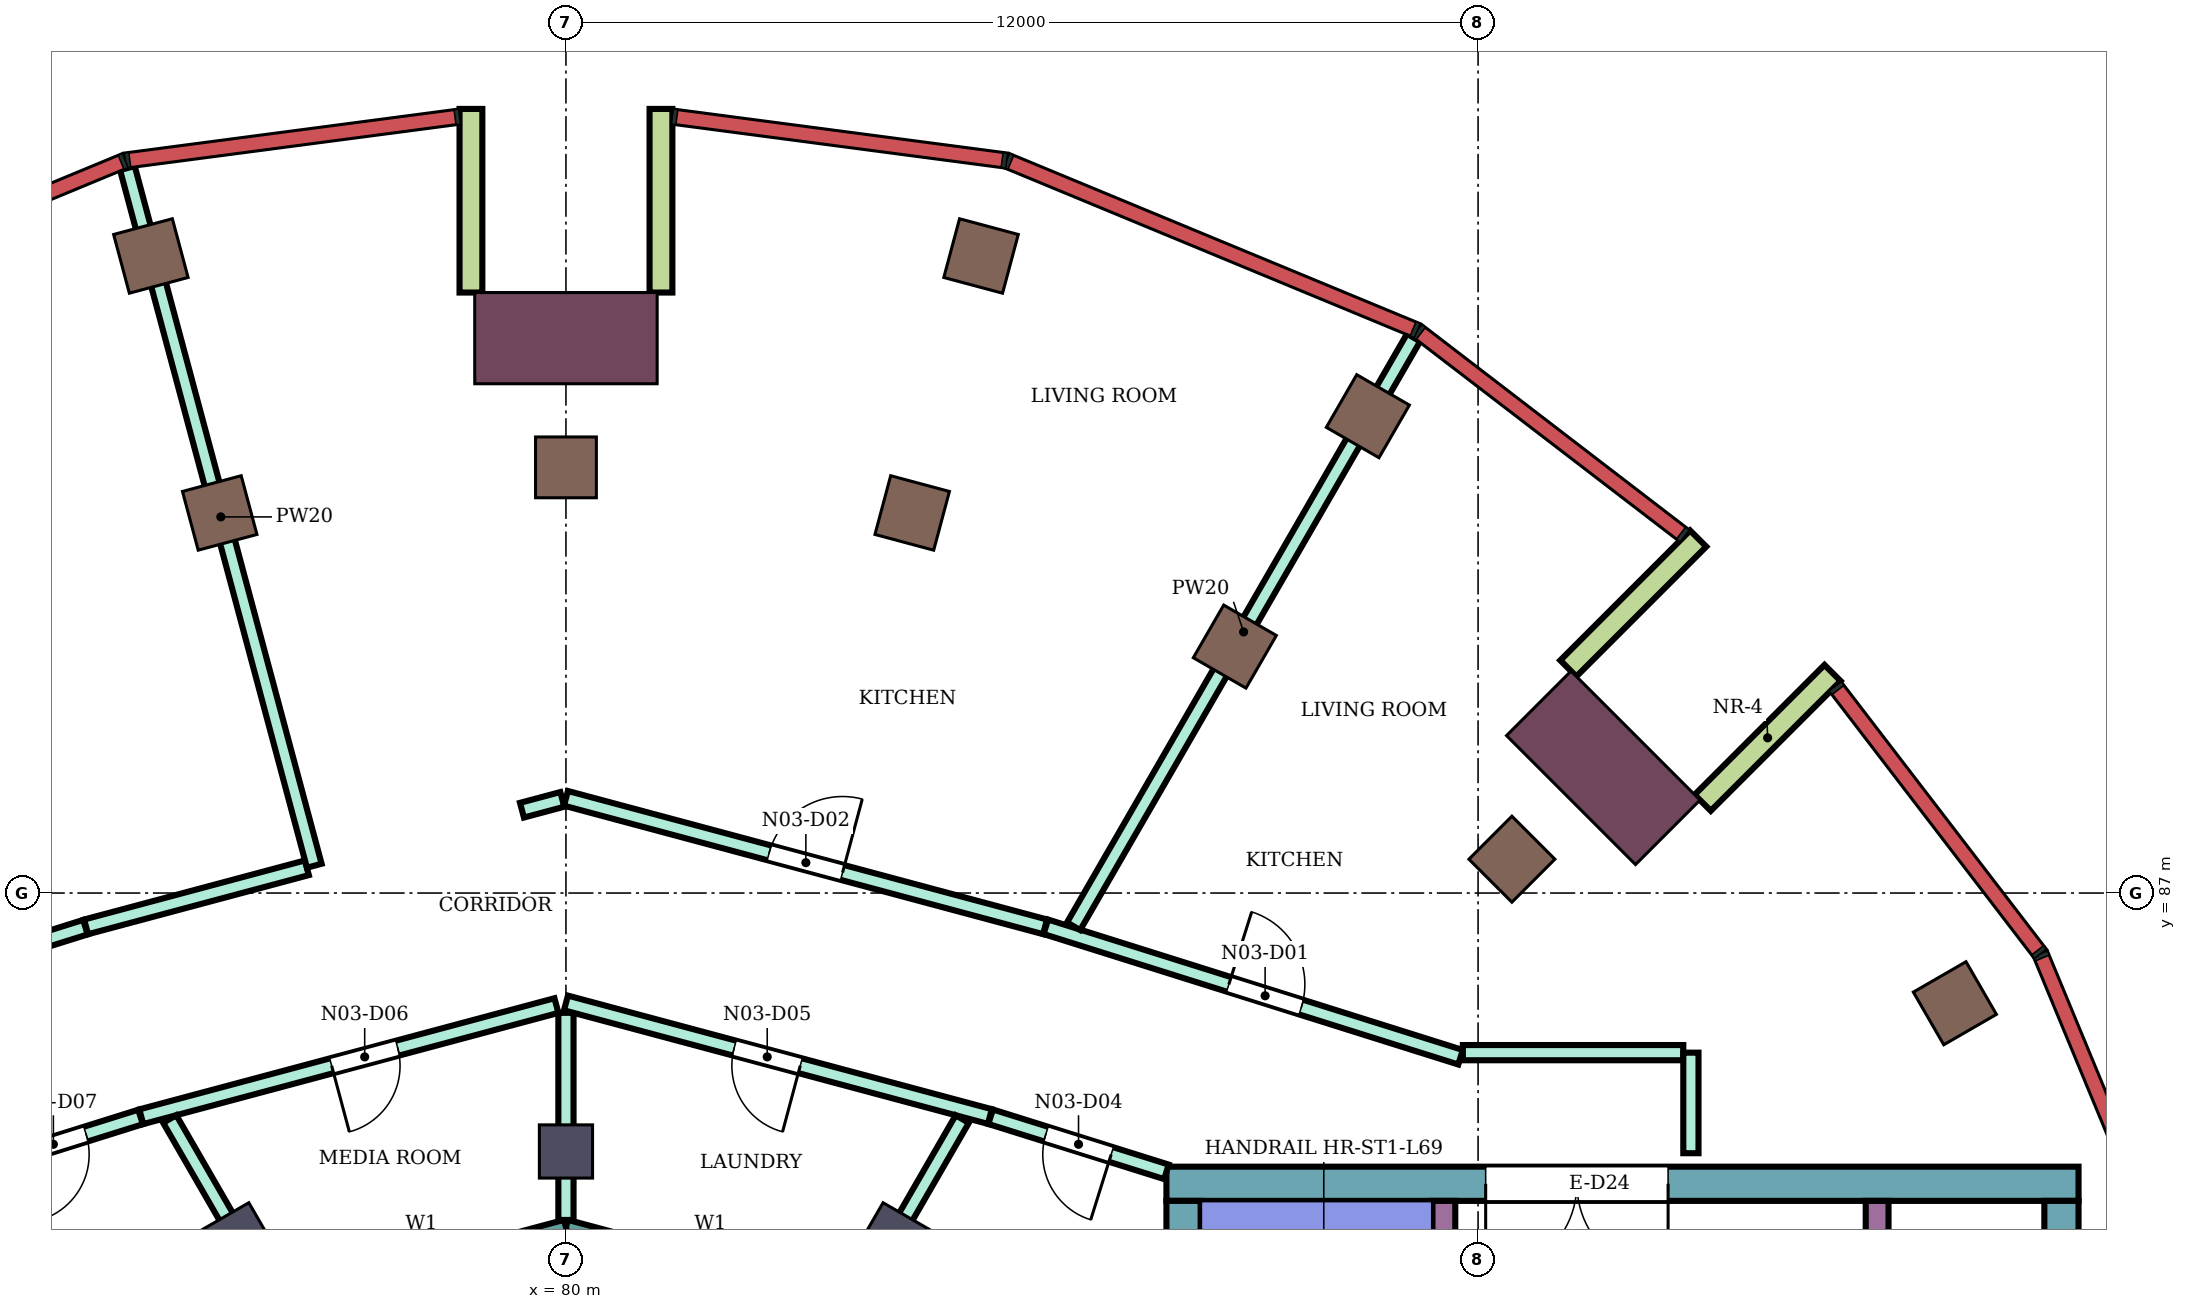
"""IFC4 building model, lengths in metres.
Left out: names, types, materials, properties, quantities, classifications, styles, units other than length and angle.
Written with IfcOpenShell. Run it as: python <this file> out.ifc"""

import sys

from ifc_helpers import new_model, si_unit, direction, frame, frame_2d, origin, origin_2d, place, context, subcontext, project, spatial, rectangle, extrude, element, fill, save


model = new_model("IFC4")
c1 = context("Model", 3, precision=1e-05, world=origin(), true_north=direction((0.0, 1.0)))
c2 = subcontext(c1, "Body", "Model", "MODEL_VIEW")
j1 = project(units=[si_unit("LENGTHUNIT", "METRE"), si_unit("PLANEANGLEUNIT", "RADIAN")], contexts=[c1])
p1 = place(None, origin())
s1 = spatial("IfcSite", under=j1, at=p1, CompositionType="ELEMENT")
p2 = place(p1, origin())
s2 = spatial("IfcBuilding", under=s1, at=p2, CompositionType="ELEMENT")
p3 = place(p2, frame((0.0, 0.0, 300.9)))
s3 = spatial("IfcBuildingStorey", under=s2, at=p3, CompositionType="ELEMENT", Elevation=300.9)
for number, where, z_axis, x_axis in (
    (1, (98.273, 85.55, 0.0), (0.0, 0.0, 1.0), (0.866, 0.5, 0.0)),
    (2, (90.55, 93.273, 0.0), (0.0, 0.0, 1.0), (0.5, 0.866, 0.0)),
    (3, (85.461, 95.381, 0.0), (0.0, 0.0, 1.0), (0.259, 0.966, 0.0)),
    (4, (74.539, 95.381, 0.0), (0.0, 0.0, 1.0), (-0.259, 0.966, 0.0)),
    (5, (92.445, 87.445, 0.0), (0.0, 0.0, 1.0), (0.707, 0.707, 0.0)),
    (6, (88.8, 90.242, 0.0), (0.0, 0.0, 1.0), (0.5, 0.866, 0.0)),
    (7, (84.555, 92.0, 0.0), (0.0, 0.0, 1.0), (0.259, 0.966, 0.0)),
    (8, (80.0, 92.6, 0.0), (0.0, 0.0, 1.0), (0.0, 1.0, 0.0)),
    (9, (75.445, 92.0, 0.0), (0.0, 0.0, 1.0), (-0.259, 0.966, 0.0)),
):
    element("IfcColumn", number, at=place(p3, frame(where, z_axis=z_axis, x_axis=x_axis)), inside=s3, PredefinedType="COLUMN", context=c2, shape_type="SweptSolid", body=[
        extrude(rectangle(XDim=0.8, YDim=0.8, at=origin_2d()), origin(), (0.0, 0.0, 1.0), 4.2),
    ])
for number, where, z_axis, x_axis in (
    (10, (84.3, 82.448, 0.0), (0.0, 0.0, 1.0), (0.5, 0.866, 0.0)),
    (11, (80.0, 83.6, 0.0), (0.0, 0.0, 1.0), (0.0, 1.0, 0.0)),
    (12, (75.7, 82.448, 0.0), (0.0, 0.0, 1.0), (-0.5, 0.866, 0.0)),
):
    element("IfcColumn", number, at=place(p3, frame(where, z_axis=z_axis, x_axis=x_axis)), inside=s3, PredefinedType="COLUMN", context=c2, shape_type="SweptSolid", body=[
        extrude(rectangle(XDim=0.7, YDim=0.7, at=origin_2d()), origin(), (0.0, 0.0, 1.0), 4.2),
    ])
for number, where, z_axis, x_axis in (
    (13, (93.647, 88.647, 0.0), (0.0, 0.0, 1.0), (0.707, 0.707, 0.0)),
    (14, (80.0, 94.3, 0.0), (0.0, 0.0, 1.0), (0.0, 1.0, 0.0)),
):
    element("IfcColumn", number, at=place(p3, frame(where, z_axis=z_axis, x_axis=x_axis)), inside=s3, PredefinedType="COLUMN", context=c2, shape_type="SweptSolid", body=[
        extrude(rectangle(XDim=1.2, YDim=2.4, at=origin_2d()), origin(), (0.0, 0.0, 1.0), 4.2),
    ])
p4 = place(p3, frame((87.9, 83.175, 0.0), z_axis=(0.0, 0.0, 1.0), x_axis=(1.0, 0.0, 0.0)))
e15 = element("IfcWall", 15, at=p4, inside=s3, PredefinedType="SHEAR", context=c2, shape_type="SweptSolid", body=[
    extrude(rectangle(XDim=12.0, YDim=0.45, at=frame_2d((6.0, 0.0))), origin(), (0.0, 0.0, 1.0), 3.88),
])
p5 = place(p4, frame((4.2, 0.0, 0.0)))
e16 = element("IfcOpeningElement", 16, at=p5, cuts=e15, PredefinedType="OPENING", context=c2, shape_type="SweptSolid", body=[
    extrude(rectangle(XDim=2.4, YDim=2.4, at=frame_2d((1.2, 1.2))), frame((0.0, 0.235, 0.0), z_axis=(0.0, -1.0, 0.0), x_axis=(1.0, 0.0, 0.0)), (0.0, 0.0, 1.0), 0.47),
])
p6 = place(p3, frame((88.125, 75.0, 0.0), z_axis=(0.0, 0.0, 1.0), x_axis=(0.0, 1.0, 0.0)))
e17 = element("IfcWall", 17, at=p6, inside=s3, PredefinedType="SHEAR", context=c2, shape_type="SweptSolid", body=[
    extrude(rectangle(XDim=7.95, YDim=0.45, at=frame_2d((3.975, 0.0))), origin(), (0.0, 0.0, 1.0), 3.88),
])
p7 = place(p3, frame((99.675, 73.6, 0.0), z_axis=(0.0, 0.0, 1.0), x_axis=(0.0, 1.0, 0.0)))
e18 = element("IfcWall", 18, at=p7, inside=s3, PredefinedType="SHEAR", context=c2, shape_type="SweptSolid", body=[
    extrude(rectangle(XDim=9.35, YDim=0.45, at=frame_2d((4.675, 0.0))), origin(), (0.0, 0.0, 1.0), 3.88),
])
p8 = place(p3, frame((91.55, 75.0, 0.0), z_axis=(0.0, 0.0, 1.0), x_axis=(0.0, 1.0, 0.0)))
e19 = element("IfcWall", 19, at=p8, inside=s3, PredefinedType="SHEAR", context=c2, shape_type="SweptSolid", body=[
    extrude(rectangle(XDim=7.95, YDim=0.3, at=frame_2d((3.975, 0.0))), origin(), (0.0, 0.0, 1.0), 3.88),
])
p9 = place(p8, frame((1.85, 0.0, 0.0)))
e20 = element("IfcOpeningElement", 20, at=p9, cuts=e19, PredefinedType="OPENING", context=c2, shape_type="SweptSolid", body=[
    extrude(rectangle(XDim=0.9, YDim=2.1, at=frame_2d((0.45, 1.05))), frame((0.0, 0.16, 0.0), z_axis=(0.0, -1.0, 0.0), x_axis=(1.0, 0.0, 0.0)), (0.0, 0.0, 1.0), 0.32),
])
p10 = place(p3, frame((97.25, 80.05, 0.0), z_axis=(0.0, 0.0, 1.0), x_axis=(0.0, 1.0, 0.0)))
e21 = element("IfcWall", 21, at=p10, inside=s3, PredefinedType="SHEAR", context=c2, shape_type="SweptSolid", body=[
    extrude(rectangle(XDim=2.9, YDim=0.3, at=frame_2d((1.45, 0.0))), origin(), (0.0, 0.0, 1.0), 3.88),
])
for number, where, z_axis, x_axis in (
    (22, (94.955, 88.188, 0.0), (0.0, 0.0, 1.0), (0.707, 0.707, 0.0)),
    (23, (93.188, 89.955, 0.0), (0.0, 0.0, 1.0), (0.707, 0.707, 0.0)),
    (24, (81.25, 94.9, 0.0), (0.0, 0.0, 1.0), (0.0, 1.0, 0.0)),
    (25, (78.75, 94.9, 0.0), (0.0, 0.0, 1.0), (0.0, 1.0, 0.0)),
):
    element("IfcWall", number, at=place(p3, frame(where, z_axis=z_axis, x_axis=x_axis)), inside=s3, PredefinedType="NOTDEFINED", context=c2, shape_type="SweptSolid", body=[
        extrude(rectangle(XDim=2.416, YDim=0.3, at=frame_2d((1.208, 0.0))), origin(), (0.0, 0.0, 1.0), 4.2),
    ])
p11 = place(p3, frame((83.802, 81.585, 0.0), z_axis=(0.0, 0.0, 1.0), x_axis=(-0.965933654434, 0.258789828301, 0.0)))
e26 = element("IfcWall", 26, at=p11, inside=s3, PredefinedType="NOTDEFINED", context=c2, shape_type="SweptSolid", body=[
    extrude(rectangle(XDim=3.936, YDim=0.2, at=frame_2d((1.968, 0.0))), origin(), (0.0, 0.0, 1.0), 4.2),
])
p12 = place(p11, frame((0.468, 0.0, 0.9)))
e27 = element("IfcOpeningElement", 27, at=p12, cuts=e26, PredefinedType="OPENING", context=c2, shape_type="SweptSolid", body=[
    extrude(rectangle(XDim=3.0, YDim=2.3, at=frame_2d((1.5, 1.15))), frame((0.0, 0.11, 0.0), z_axis=(0.0, -1.0, 0.0), x_axis=(1.0, 0.0, 0.0)), (0.0, 0.0, 1.0), 0.22),
])
p13 = place(p3, frame((80.0, 82.604, 0.0), z_axis=(0.0, 0.0, 1.0), x_axis=(-0.965933654434, -0.258789828301, 0.0)))
e28 = element("IfcWall", 28, at=p13, inside=s3, PredefinedType="NOTDEFINED", context=c2, shape_type="SweptSolid", body=[
    extrude(rectangle(XDim=3.936, YDim=0.2, at=frame_2d((1.968, 0.0))), origin(), (0.0, 0.0, 1.0), 4.2),
])
p14 = place(p13, frame((0.468, 0.0, 0.9)))
e29 = element("IfcOpeningElement", 29, at=p14, cuts=e28, PredefinedType="OPENING", context=c2, shape_type="SweptSolid", body=[
    extrude(rectangle(XDim=3.0, YDim=2.3, at=frame_2d((1.5, 1.15))), frame((0.0, 0.11, 0.0), z_axis=(0.0, -1.0, 0.0), x_axis=(1.0, 0.0, 0.0)), (0.0, 0.0, 1.0), 0.22),
])
p15 = place(p3, frame((68.201, 84.833, 0.0), z_axis=(0.0, 0.0, 1.0), x_axis=(0.95420102455, 0.299166182492, 0.0)))
e30 = element("IfcWall", 30, at=p15, inside=s3, PredefinedType="PARTITIONING", context=c2, shape_type="SweptSolid", body=[
    extrude(rectangle(XDim=5.74, YDim=0.2, at=frame_2d((2.87, 0.0))), origin(), (0.0, 0.0, 1.0), 3.75),
])
p16 = place(p15, frame((2.374, 0.0, 0.0)))
e31 = element("IfcOpeningElement", 31, at=p16, cuts=e30, PredefinedType="OPENING", context=c2, shape_type="SweptSolid", body=[
    extrude(rectangle(XDim=1.0, YDim=2.1, at=frame_2d((0.5, 1.05))), frame((0.0, 0.11, 0.0), z_axis=(0.0, -1.0, 0.0), x_axis=(1.0, 0.0, 0.0)), (0.0, 0.0, 1.0), 0.22),
])
p17 = place(p3, frame((72.1, 83.332, 0.0), z_axis=(0.0, 0.0, 1.0), x_axis=(0.954233106619, 0.299063836383, 0.0)))
e32 = element("IfcWall", 32, at=p17, inside=s3, PredefinedType="PARTITIONING", context=c2, shape_type="SweptSolid", body=[
    extrude(rectangle(XDim=2.414, YDim=0.2, at=frame_2d((1.207, 0.0))), origin(), (0.0, 0.0, 1.0), 3.75),
])
p18 = place(p17, frame((0.762, 0.0, 0.0)))
e33 = element("IfcOpeningElement", 33, at=p18, cuts=e32, PredefinedType="OPENING", context=c2, shape_type="SweptSolid", body=[
    extrude(rectangle(XDim=0.9, YDim=2.1, at=frame_2d((0.45, 1.05))), frame((0.0, 0.11, 0.0), z_axis=(0.0, -1.0, 0.0), x_axis=(1.0, 0.0, 0.0)), (0.0, 0.0, 1.0), 0.22),
])
p19 = place(p3, frame((73.687, 86.555, 0.0), z_axis=(0.0, 0.0, 1.0), x_axis=(0.965987897826, 0.258587279759, 0.0)))
e34 = element("IfcWall", 34, at=p19, inside=s3, PredefinedType="PARTITIONING", context=c2, shape_type="SweptSolid", body=[
    extrude(rectangle(XDim=3.007, YDim=0.2, at=frame_2d((1.503, 0.0))), origin(), (0.0, 0.0, 1.0), 3.75),
])
p20 = place(p3, frame((74.23, 96.538, 0.0), z_axis=(0.0, 0.0, 1.0), x_axis=(0.258775468547, -0.965937501538, 0.0)))
e35 = element("IfcWall", 35, at=p20, inside=s3, PredefinedType="PARTITIONING", context=c2, shape_type="SweptSolid", body=[
    extrude(rectangle(XDim=9.502, YDim=0.2, at=frame_2d((4.751, 0.0))), origin(), (0.0, 0.0, 1.0), 3.75),
])
p21 = place(p3, frame((74.413, 84.057, 0.0), z_axis=(0.0, 0.0, 1.0), x_axis=(0.965972135939, 0.258646153246, 0.0)))
e36 = element("IfcWall", 36, at=p21, inside=s3, PredefinedType="PARTITIONING", context=c2, shape_type="SweptSolid", body=[
    extrude(rectangle(XDim=5.654, YDim=0.2, at=frame_2d((2.827, 0.0))), origin(), (0.0, 0.0, 1.0), 3.75),
])
p22 = place(p21, frame((2.593, 0.0, 0.0)))
e37 = element("IfcOpeningElement", 37, at=p22, cuts=e36, PredefinedType="OPENING", context=c2, shape_type="SweptSolid", body=[
    extrude(rectangle(XDim=0.9, YDim=2.1, at=frame_2d((0.45, 1.05))), frame((0.0, 0.11, 0.0), z_axis=(0.0, -1.0, 0.0), x_axis=(1.0, 0.0, 0.0)), (0.0, 0.0, 1.0), 0.22),
])
p23 = place(p3, frame((74.787, 84.027, 0.0), z_axis=(0.0, 0.0, 1.0), x_axis=(0.500079107518, -0.86597972622, 0.0)))
e38 = element("IfcWall", 38, at=p23, inside=s3, PredefinedType="PARTITIONING", context=c2, shape_type="SweptSolid", body=[
    extrude(rectangle(XDim=2.726, YDim=0.2, at=frame_2d((1.363, 0.0))), origin(), (0.0, 0.0, 1.0), 3.75),
])
p24 = place(p3, frame((79.421, 88.09, 0.0), z_axis=(0.0, 0.0, 1.0), x_axis=(0.966065016104, 0.258299021793, 0.0)))
e39 = element("IfcWall", 39, at=p24, inside=s3, PredefinedType="PARTITIONING", context=c2, shape_type="SweptSolid", body=[
    extrude(rectangle(XDim=0.549, YDim=0.2, at=frame_2d((0.274, 0.0))), origin(), (0.0, 0.0, 1.0), 3.75),
])
p25 = place(p3, frame((80.0, 82.699, 0.0), z_axis=(0.0, 0.0, 1.0), x_axis=(0.0, 1.0, 0.0)))
e40 = element("IfcWall", 40, at=p25, inside=s3, PredefinedType="PARTITIONING", context=c2, shape_type="SweptSolid", body=[
    extrude(rectangle(XDim=2.725, YDim=0.2, at=frame_2d((1.363, 0.0))), origin(), (0.0, 0.0, 1.0), 3.75),
])
p26 = place(p3, frame((80.0, 85.554, 0.0), z_axis=(0.0, 0.0, 1.0), x_axis=(0.965928989968, -0.258807237802, 0.0)))
e41 = element("IfcWall", 41, at=p26, inside=s3, PredefinedType="PARTITIONING", context=c2, shape_type="SweptSolid", body=[
    extrude(rectangle(XDim=5.774, YDim=0.2, at=frame_2d((2.887, 0.0))), origin(), (0.0, 0.0, 1.0), 3.75),
])
p27 = place(p26, frame((2.292, 0.0, 0.0)))
e42 = element("IfcOpeningElement", 42, at=p27, cuts=e41, PredefinedType="OPENING", context=c2, shape_type="SweptSolid", body=[
    extrude(rectangle(XDim=0.9, YDim=2.1, at=frame_2d((0.45, 1.05))), frame((0.0, 0.11, 0.0), z_axis=(0.0, -1.0, 0.0), x_axis=(1.0, 0.0, 0.0)), (0.0, 0.0, 1.0), 0.22),
])
p28 = place(p3, frame((80.0, 88.246, 0.0), z_axis=(0.0, 0.0, 1.0), x_axis=(0.965856994925, -0.259075790752, 0.0)))
e43 = element("IfcWall", 43, at=p28, inside=s3, PredefinedType="PARTITIONING", context=c2, shape_type="SweptSolid", body=[
    extrude(rectangle(XDim=6.526, YDim=0.2, at=frame_2d((3.263, 0.0))), origin(), (0.0, 0.0, 1.0), 3.75),
])
p29 = place(p28, frame((2.768, 0.0, 0.0)))
e44 = element("IfcOpeningElement", 44, at=p29, cuts=e43, PredefinedType="OPENING", context=c2, shape_type="SweptSolid", body=[
    extrude(rectangle(XDim=1.0, YDim=2.1, at=frame_2d((0.5, 1.05))), frame((0.0, 0.11, 0.0), z_axis=(0.0, -1.0, 0.0), x_axis=(1.0, 0.0, 0.0)), (0.0, 0.0, 1.0), 0.22),
])
p30 = place(p3, frame((83.851, 81.666, 0.0), z_axis=(0.0, 0.0, 1.0), x_axis=(0.500146274735, 0.865940935554, 0.0)))
e45 = element("IfcWall", 45, at=p30, inside=s3, PredefinedType="PARTITIONING", context=c2, shape_type="SweptSolid", body=[
    extrude(rectangle(XDim=2.726, YDim=0.2, at=frame_2d((1.363, 0.0))), origin(), (0.0, 0.0, 1.0), 3.75),
])
p31 = place(p3, frame((85.587, 84.057, 0.0), z_axis=(0.0, 0.0, 1.0), x_axis=(0.954239513179, -0.299043393987, 0.0)))
e46 = element("IfcWall", 46, at=p31, inside=s3, PredefinedType="PARTITIONING", context=c2, shape_type="SweptSolid", body=[
    extrude(rectangle(XDim=2.424, YDim=0.2, at=frame_2d((1.212, 0.0))), origin(), (0.0, 0.0, 1.0), 3.75),
])
p32 = place(p31, frame((0.762, 0.0, 0.0)))
e47 = element("IfcOpeningElement", 47, at=p32, cuts=e46, PredefinedType="OPENING", context=c2, shape_type="SweptSolid", body=[
    extrude(rectangle(XDim=0.9, YDim=2.1, at=frame_2d((0.45, 1.05))), frame((0.0, 0.11, 0.0), z_axis=(0.0, -1.0, 0.0), x_axis=(1.0, 0.0, 0.0)), (0.0, 0.0, 1.0), 0.22),
])
p33 = place(p3, frame((86.314, 86.556, 0.0), z_axis=(0.0, 0.0, 1.0), x_axis=(0.953912400139, -0.300085209334, 0.0)))
e48 = element("IfcWall", 48, at=p33, inside=s3, PredefinedType="PARTITIONING", context=c2, shape_type="SweptSolid", body=[
    extrude(rectangle(XDim=5.719, YDim=0.2, at=frame_2d((2.86, 0.0))), origin(), (0.0, 0.0, 1.0), 3.75),
])
p34 = place(p33, frame((2.524, 0.0, 0.0)))
e49 = element("IfcOpeningElement", 49, at=p34, cuts=e48, PredefinedType="OPENING", context=c2, shape_type="SweptSolid", body=[
    extrude(rectangle(XDim=1.0, YDim=2.1, at=frame_2d((0.5, 1.05))), frame((0.0, 0.11, 0.0), z_axis=(0.0, -1.0, 0.0), x_axis=(1.0, 0.0, 0.0)), (0.0, 0.0, 1.0), 0.22),
])
p35 = place(p3, frame((86.679, 86.563, 0.0), z_axis=(0.0, 0.0, 1.0), x_axis=(0.500152516677, 0.865937330331, 0.0)))
e50 = element("IfcWall", 50, at=p35, inside=s3, PredefinedType="PARTITIONING", context=c2, shape_type="SweptSolid", body=[
    extrude(rectangle(XDim=8.943, YDim=0.2, at=frame_2d((4.472, 0.0))), origin(), (0.0, 0.0, 1.0), 3.75),
])
p36 = place(p3, frame((91.8, 84.9, 0.0), z_axis=(0.0, 0.0, 1.0), x_axis=(1.0, 0.0, 0.0)))
e51 = element("IfcWall", 51, at=p36, inside=s3, PredefinedType="PARTITIONING", context=c2, shape_type="SweptSolid", body=[
    extrude(rectangle(XDim=2.9, YDim=0.2, at=frame_2d((1.45, 0.0))), origin(), (0.0, 0.0, 1.0), 3.75),
])
p37 = place(p3, frame((94.8, 83.577, 0.0), z_axis=(0.0, 0.0, 1.0), x_axis=(0.0, 1.0, 0.0)))
e52 = element("IfcWall", 52, at=p37, inside=s3, PredefinedType="PARTITIONING", context=c2, shape_type="SweptSolid", body=[
    extrude(rectangle(XDim=1.323, YDim=0.2, at=frame_2d((0.662, 0.0))), origin(), (0.0, 0.0, 1.0), 3.75),
])
p38 = place(p34, origin())
e53 = element("IfcDoor", 53, at=p38, inside=s3, OperationType="SINGLE_SWING_LEFT", PredefinedType="DOOR", context=c2, shape_type="SweptSolid", body=[
    extrude(rectangle(XDim=1.0, YDim=2.1, at=frame_2d((0.5, 1.05))), frame((0.0, 0.025, 0.0), z_axis=(0.0, -1.0, 0.0), x_axis=(1.0, 0.0, 0.0)), (0.0, 0.0, 1.0), 0.05),
])
fill(e49, e53)
p39 = place(p29, origin())
e54 = element("IfcDoor", 54, at=p39, inside=s3, OperationType="SINGLE_SWING_RIGHT", PredefinedType="DOOR", context=c2, shape_type="SweptSolid", body=[
    extrude(rectangle(XDim=1.0, YDim=2.1, at=frame_2d((0.5, 1.05))), frame((0.0, 0.025, 0.0), z_axis=(0.0, -1.0, 0.0), x_axis=(1.0, 0.0, 0.0)), (0.0, 0.0, 1.0), 0.05),
])
fill(e44, e54)
p40 = place(p32, frame((0.9, 0.0, 0.0), z_axis=(0.0, 0.0, 1.0), x_axis=(-1.0, 0.0, 0.0)))
e55 = element("IfcDoor", 55, at=p40, inside=s3, OperationType="SINGLE_SWING_LEFT", PredefinedType="DOOR", context=c2, shape_type="SweptSolid", body=[
    extrude(rectangle(XDim=0.9, YDim=2.1, at=frame_2d((0.45, 1.05))), frame((0.0, 0.025, 0.0), z_axis=(0.0, -1.0, 0.0), x_axis=(1.0, 0.0, 0.0)), (0.0, 0.0, 1.0), 0.05),
])
fill(e47, e55)
p41 = place(p27, frame((0.9, 0.0, 0.0), z_axis=(0.0, 0.0, 1.0), x_axis=(-1.0, 0.0, 0.0)))
e56 = element("IfcDoor", 56, at=p41, inside=s3, OperationType="SINGLE_SWING_LEFT", PredefinedType="DOOR", context=c2, shape_type="SweptSolid", body=[
    extrude(rectangle(XDim=0.9, YDim=2.1, at=frame_2d((0.45, 1.05))), frame((0.0, 0.025, 0.0), z_axis=(0.0, -1.0, 0.0), x_axis=(1.0, 0.0, 0.0)), (0.0, 0.0, 1.0), 0.05),
])
fill(e42, e56)
p42 = place(p22, frame((0.9, 0.0, 0.0), z_axis=(0.0, 0.0, 1.0), x_axis=(-1.0, 0.0, 0.0)))
e57 = element("IfcDoor", 57, at=p42, inside=s3, OperationType="SINGLE_SWING_RIGHT", PredefinedType="DOOR", context=c2, shape_type="SweptSolid", body=[
    extrude(rectangle(XDim=0.9, YDim=2.1, at=frame_2d((0.45, 1.05))), frame((0.0, 0.025, 0.0), z_axis=(0.0, -1.0, 0.0), x_axis=(1.0, 0.0, 0.0)), (0.0, 0.0, 1.0), 0.05),
])
fill(e37, e57)
p43 = place(p18, frame((0.9, 0.0, 0.0), z_axis=(0.0, 0.0, 1.0), x_axis=(-1.0, 0.0, 0.0)))
e58 = element("IfcDoor", 58, at=p43, inside=s3, OperationType="SINGLE_SWING_RIGHT", PredefinedType="DOOR", context=c2, shape_type="SweptSolid", body=[
    extrude(rectangle(XDim=0.9, YDim=2.1, at=frame_2d((0.45, 1.05))), frame((0.0, 0.025, 0.0), z_axis=(0.0, -1.0, 0.0), x_axis=(1.0, 0.0, 0.0)), (0.0, 0.0, 1.0), 0.05),
])
fill(e33, e58)
p44 = place(p5, frame((2.4, 0.0, 0.0), z_axis=(0.0, 0.0, 1.0), x_axis=(-1.0, 0.0, 0.0)))
e59 = element("IfcDoor", 59, at=p44, inside=s3, OperationType="DOUBLE_DOOR_SINGLE_SWING", PredefinedType="DOOR", context=c2, shape_type="SweptSolid", body=[
    extrude(rectangle(XDim=2.4, YDim=2.4, at=frame_2d((1.2, 1.2))), frame((0.0, 0.025, 0.0), z_axis=(0.0, -1.0, 0.0), x_axis=(1.0, 0.0, 0.0)), (0.0, 0.0, 1.0), 0.05),
])
fill(e16, e59)
save(model, sys.argv[1])
